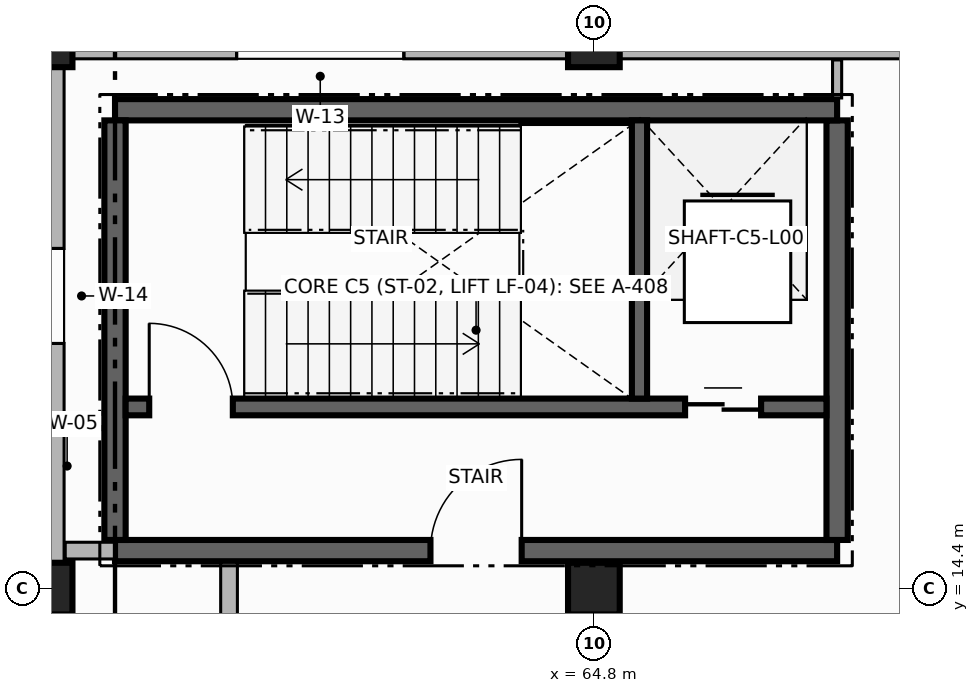
"""IFC4 building model, lengths in metres.
Left out: names, types, materials, properties, quantities, classifications, styles, units other than length and angle.
Written with IfcOpenShell. Run it as: python <this file> out.ifc"""

import sys

from ifc_helpers import new_model, si_unit, direction, frame, frame_2d, origin, origin_2d, place, context, subcontext, project, spatial, rectangle, extrude, element, fill, save


model = new_model("IFC4")
c1 = context("Model", 3, precision=1e-05, world=origin(), true_north=direction((0.0, 1.0)))
c2 = subcontext(c1, "Body", "Model", "MODEL_VIEW")
j1 = project(units=[si_unit("LENGTHUNIT", "METRE"), si_unit("PLANEANGLEUNIT", "RADIAN")], contexts=[c1])
p1 = place(None, origin())
s1 = spatial("IfcSite", under=j1, at=p1, CompositionType="ELEMENT")
p2 = place(p1, origin())
s2 = spatial("IfcBuilding", under=s1, at=p2, CompositionType="ELEMENT")
p3 = place(p2, origin())
s3 = spatial("IfcBuildingStorey", under=s2, at=p3, CompositionType="ELEMENT", Elevation=0.0)
for number, where, z_axis, x_axis in (
    (1, (57.6, 14.4, 0.0), (0.0, 0.0, 1.0), (1.0, 0.0, 0.0)),
    (2, (57.6, 21.6, 0.0), (0.0, 0.0, 1.0), (1.0, 0.0, 0.0)),
    (3, (64.8, 14.4, 0.0), (0.0, 0.0, 1.0), (1.0, 0.0, 0.0)),
    (4, (64.8, 21.6, 0.0), (0.0, 0.0, 1.0), (1.0, 0.0, 0.0)),
):
    element("IfcColumn", number, at=place(p3, frame(where, z_axis=z_axis, x_axis=x_axis)), inside=s3, PredefinedType="COLUMN", context=c2, shape_type="SweptSolid", body=[
        extrude(rectangle(XDim=0.68, YDim=0.68, at=origin_2d()), origin(), (0.0, 0.0, 1.0), 4.15),
    ])
p4 = place(p3, frame((72.0, 21.6, 0.0), z_axis=(0.0, 0.0, 1.0), x_axis=(-1.0, 0.0, 0.0)))
e5 = element("IfcWall", 5, at=p4, inside=s3, PredefinedType="SOLIDWALL", context=c2, shape_type="SweptSolid", body=[
    extrude(rectangle(XDim=7.2, YDim=0.46, at=frame_2d((3.6, 0.0))), origin(), (0.0, 0.0, 1.0), 3.43),
])
p5 = place(p4, frame((0.9, 0.0, 1.2)))
e6 = element("IfcOpeningElement", 6, at=p5, cuts=e5, PredefinedType="OPENING", context=c2, shape_type="SweptSolid", body=[
    extrude(rectangle(XDim=2.2, YDim=1.1, at=frame_2d((1.1, 0.55))), frame((0.0, 0.24, 0.0), z_axis=(0.0, -1.0, 0.0), x_axis=(1.0, 0.0, 0.0)), (0.0, 0.0, 1.0), 0.48),
])
p6 = place(p3, frame((64.8, 21.6, 0.0), z_axis=(0.0, 0.0, 1.0), x_axis=(-1.0, 0.0, 0.0)))
e7 = element("IfcWall", 7, at=p6, inside=s3, PredefinedType="SOLIDWALL", context=c2, shape_type="SweptSolid", body=[
    extrude(rectangle(XDim=7.2, YDim=0.46, at=frame_2d((3.6, 0.0))), origin(), (0.0, 0.0, 1.0), 3.43),
])
p7 = place(p6, frame((2.5, 0.0, 1.2)))
e8 = element("IfcOpeningElement", 8, at=p7, cuts=e7, PredefinedType="OPENING", context=c2, shape_type="SweptSolid", body=[
    extrude(rectangle(XDim=2.2, YDim=1.1, at=frame_2d((1.1, 0.55))), frame((0.0, 0.24, 0.0), z_axis=(0.0, -1.0, 0.0), x_axis=(1.0, 0.0, 0.0)), (0.0, 0.0, 1.0), 0.48),
])
p8 = place(p3, frame((57.6, 21.6, 0.0), z_axis=(0.0, 0.0, 1.0), x_axis=(0.0, -1.0, 0.0)))
e9 = element("IfcWall", 9, at=p8, inside=s3, PredefinedType="SOLIDWALL", context=c2, shape_type="SweptSolid", body=[
    extrude(rectangle(XDim=7.2, YDim=0.46, at=frame_2d((3.6, 0.0))), origin(), (0.0, 0.0, 1.0), 3.43),
])
p9 = place(p8, frame((2.725, 0.0, 1.2)))
e10 = element("IfcOpeningElement", 10, at=p9, cuts=e9, PredefinedType="OPENING", context=c2, shape_type="SweptSolid", body=[
    extrude(rectangle(XDim=1.25, YDim=1.35, at=frame_2d((0.625, 0.675))), frame((0.0, 0.24, 0.0), z_axis=(0.0, -1.0, 0.0), x_axis=(1.0, 0.0, 0.0)), (0.0, 0.0, 1.0), 0.48),
])
p10 = place(p3, frame((57.6, 14.4, 0.0), z_axis=(0.0, 0.0, 1.0), x_axis=(0.0, -1.0, 0.0)))
e11 = element("IfcWall", 11, at=p10, inside=s3, PredefinedType="SOLIDWALL", context=c2, shape_type="SweptSolid", body=[
    extrude(rectangle(XDim=7.2, YDim=0.46, at=frame_2d((3.6, 0.0))), origin(), (0.0, 0.0, 1.0), 3.43),
])
p11 = place(p10, frame((4.1, 0.0, 0.0)))
e12 = element("IfcOpeningElement", 12, at=p11, cuts=e11, PredefinedType="OPENING", context=c2, shape_type="SweptSolid", body=[
    extrude(rectangle(XDim=1.8, YDim=2.4, at=frame_2d((0.9, 1.2))), frame((0.0, 0.24, 0.0), z_axis=(0.0, -1.0, 0.0), x_axis=(1.0, 0.0, 0.0)), (0.0, 0.0, 1.0), 0.48),
])
p12 = place(p3, frame((58.5, 14.9, 0.0), z_axis=(0.0, 0.0, 1.0), x_axis=(1.0, 0.0, 0.0)))
e13 = element("IfcWall", 13, at=p12, inside=s3, PredefinedType="SHEAR", context=c2, shape_type="SweptSolid", body=[
    extrude(rectangle(XDim=9.5, YDim=0.28, at=frame_2d((4.75, 0.0))), origin(), (0.0, 0.0, 1.0), 4.15),
])
p13 = place(p12, frame((4.15, 0.0, 0.0)))
e14 = element("IfcOpeningElement", 14, at=p13, cuts=e13, PredefinedType="OPENING", context=c2, shape_type="SweptSolid", body=[
    extrude(rectangle(XDim=1.2, YDim=2.25, at=frame_2d((0.6, 1.125))), frame((0.0, 0.15, 0.0), z_axis=(0.0, -1.0, 0.0), x_axis=(1.0, 0.0, 0.0)), (0.0, 0.0, 1.0), 0.3),
])
p14 = place(p3, frame((68.0, 15.04, 0.0), z_axis=(0.0, 0.0, 1.0), x_axis=(0.0, 1.0, 0.0)))
e15 = element("IfcWall", 15, at=p14, inside=s3, PredefinedType="SHEAR", context=c2, shape_type="SweptSolid", body=[
    extrude(rectangle(XDim=5.52, YDim=0.28, at=frame_2d((2.76, 0.0))), origin(), (0.0, 0.0, 1.0), 4.15),
])
p15 = place(p3, frame((68.0, 20.7, 0.0), z_axis=(0.0, 0.0, 1.0), x_axis=(-1.0, 0.0, 0.0)))
e16 = element("IfcWall", 16, at=p15, inside=s3, PredefinedType="SHEAR", context=c2, shape_type="SweptSolid", body=[
    extrude(rectangle(XDim=9.5, YDim=0.28, at=frame_2d((4.75, 0.0))), origin(), (0.0, 0.0, 1.0), 4.15),
])
p16 = place(p3, frame((58.5, 20.56, 0.0), z_axis=(0.0, 0.0, 1.0), x_axis=(0.0, -1.0, 0.0)))
e17 = element("IfcWall", 17, at=p16, inside=s3, PredefinedType="SHEAR", context=c2, shape_type="SweptSolid", body=[
    extrude(rectangle(XDim=5.52, YDim=0.28, at=frame_2d((2.76, 0.0))), origin(), (0.0, 0.0, 1.0), 4.15),
])
p17 = place(p3, frame((58.64, 16.79, 0.0), z_axis=(0.0, 0.0, 1.0), x_axis=(1.0, 0.0, 0.0)))
e18 = element("IfcWall", 18, at=p17, inside=s3, PredefinedType="SHEAR", context=c2, shape_type="SweptSolid", body=[
    extrude(rectangle(XDim=9.22, YDim=0.22, at=frame_2d((4.61, 0.0))), origin(), (0.0, 0.0, 1.0), 4.15),
])
p18 = place(p17, frame((0.31, 0.0, 0.0)))
e19 = element("IfcOpeningElement", 19, at=p18, cuts=e18, PredefinedType="OPENING", context=c2, shape_type="SweptSolid", body=[
    extrude(rectangle(XDim=1.1, YDim=2.15, at=frame_2d((0.55, 1.075))), frame((0.0, 0.12, 0.0), z_axis=(0.0, -1.0, 0.0), x_axis=(1.0, 0.0, 0.0)), (0.0, 0.0, 1.0), 0.24),
])
p19 = place(p17, frame((7.36, 0.0, 0.0)))
e20 = element("IfcOpeningElement", 20, at=p19, cuts=e18, PredefinedType="OPENING", context=c2, shape_type="SweptSolid", body=[
    extrude(rectangle(XDim=1.0, YDim=2.2, at=frame_2d((0.5, 1.1))), frame((0.0, 0.12, 0.0), z_axis=(0.0, -1.0, 0.0), x_axis=(1.0, 0.0, 0.0)), (0.0, 0.0, 1.0), 0.24),
])
p20 = place(p3, frame((65.4, 16.9, 0.0), z_axis=(0.0, 0.0, 1.0), x_axis=(0.0, 1.0, 0.0)))
e21 = element("IfcWall", 21, at=p20, inside=s3, PredefinedType="SHEAR", context=c2, shape_type="SweptSolid", body=[
    extrude(rectangle(XDim=3.66, YDim=0.2, at=frame_2d((1.83, 0.0))), origin(), (0.0, 0.0, 1.0), 4.15),
])
p21 = place(p3, frame((57.845, 14.9, 0.0), z_axis=(0.0, 0.0, 1.0), x_axis=(1.0, 0.0, 0.0)))
e22 = element("IfcWall", 22, at=p21, inside=s3, PredefinedType="SOLIDWALL", context=c2, shape_type="SweptSolid", body=[
    extrude(rectangle(XDim=0.655, YDim=0.22, at=frame_2d((0.328, 0.0))), origin(), (0.0, 0.0, 1.0), 3.41),
])
p22 = place(p3, frame((60.0, 14.745, 0.0), z_axis=(0.0, 0.0, 1.0), x_axis=(0.0, -1.0, 0.0)))
e23 = element("IfcWall", 23, at=p22, inside=s3, PredefinedType="SOLIDWALL", context=c2, shape_type="SweptSolid", body=[
    extrude(rectangle(XDim=4.445, YDim=0.22, at=frame_2d((2.223, 0.0))), origin(), (0.0, 0.0, 1.0), 3.41),
])
p23 = place(p22, frame((2.365, 0.0, 0.0)))
e24 = element("IfcOpeningElement", 24, at=p23, cuts=e23, PredefinedType="OPENING", context=c2, shape_type="SweptSolid", body=[
    extrude(rectangle(XDim=1.6, YDim=2.3, at=frame_2d((0.8, 1.15))), frame((0.0, 0.12, 0.0), z_axis=(0.0, -1.0, 0.0), x_axis=(1.0, 0.0, 0.0)), (0.0, 0.0, 1.0), 0.24),
])
p24 = place(p3, frame((64.8, 10.394, 0.0), z_axis=(0.0, 0.0, 1.0), x_axis=(0.0, 1.0, 0.0)))
e25 = element("IfcWall", 25, at=p24, inside=s3, PredefinedType="PARTITIONING", context=c2, shape_type="SweptSolid", body=[
    extrude(rectangle(XDim=4.351, YDim=0.12, at=frame_2d((2.176, 0.0))), origin(), (0.0, 0.0, 1.0), 3.41),
])
p25 = place(p3, frame((68.0, 20.855, 0.0), z_axis=(0.0, 0.0, 1.0), x_axis=(0.0, 1.0, 0.0)))
e26 = element("IfcWall", 26, at=p25, inside=s3, PredefinedType="PARTITIONING", context=c2, shape_type="SweptSolid", body=[
    extrude(rectangle(XDim=0.5, YDim=0.12, at=frame_2d((0.25, 0.0))), origin(), (0.0, 0.0, 1.0), 3.41),
])
p26 = place(p18, origin())
e27 = element("IfcDoor", 27, at=p26, inside=s3, OperationType="SINGLE_SWING_LEFT", PredefinedType="DOOR", context=c2, shape_type="SweptSolid", body=[
    extrude(rectangle(XDim=1.1, YDim=2.15, at=frame_2d((0.55, 1.075))), frame((0.0, 0.025, 0.0), z_axis=(0.0, -1.0, 0.0), x_axis=(1.0, 0.0, 0.0)), (0.0, 0.0, 1.0), 0.05),
])
fill(e19, e27)
p27 = place(p19, origin())
e28 = element("IfcDoor", 28, at=p27, inside=s3, OperationType="DOUBLE_DOOR_SLIDING", PredefinedType="DOOR", context=c2, shape_type="SweptSolid", body=[
    extrude(rectangle(XDim=1.0, YDim=2.2, at=frame_2d((0.5, 1.1))), frame((0.0, 0.025, 0.0), z_axis=(0.0, -1.0, 0.0), x_axis=(1.0, 0.0, 0.0)), (0.0, 0.0, 1.0), 0.05),
])
fill(e20, e28)
p28 = place(p13, origin())
e29 = element("IfcDoor", 29, at=p28, inside=s3, OperationType="SINGLE_SWING_RIGHT", PredefinedType="DOOR", context=c2, shape_type="SweptSolid", body=[
    extrude(rectangle(XDim=1.2, YDim=2.25, at=frame_2d((0.6, 1.125))), frame((0.0, 0.025, 0.0), z_axis=(0.0, -1.0, 0.0), x_axis=(1.0, 0.0, 0.0)), (0.0, 0.0, 1.0), 0.05),
])
fill(e14, e29)
save(model, sys.argv[1])
